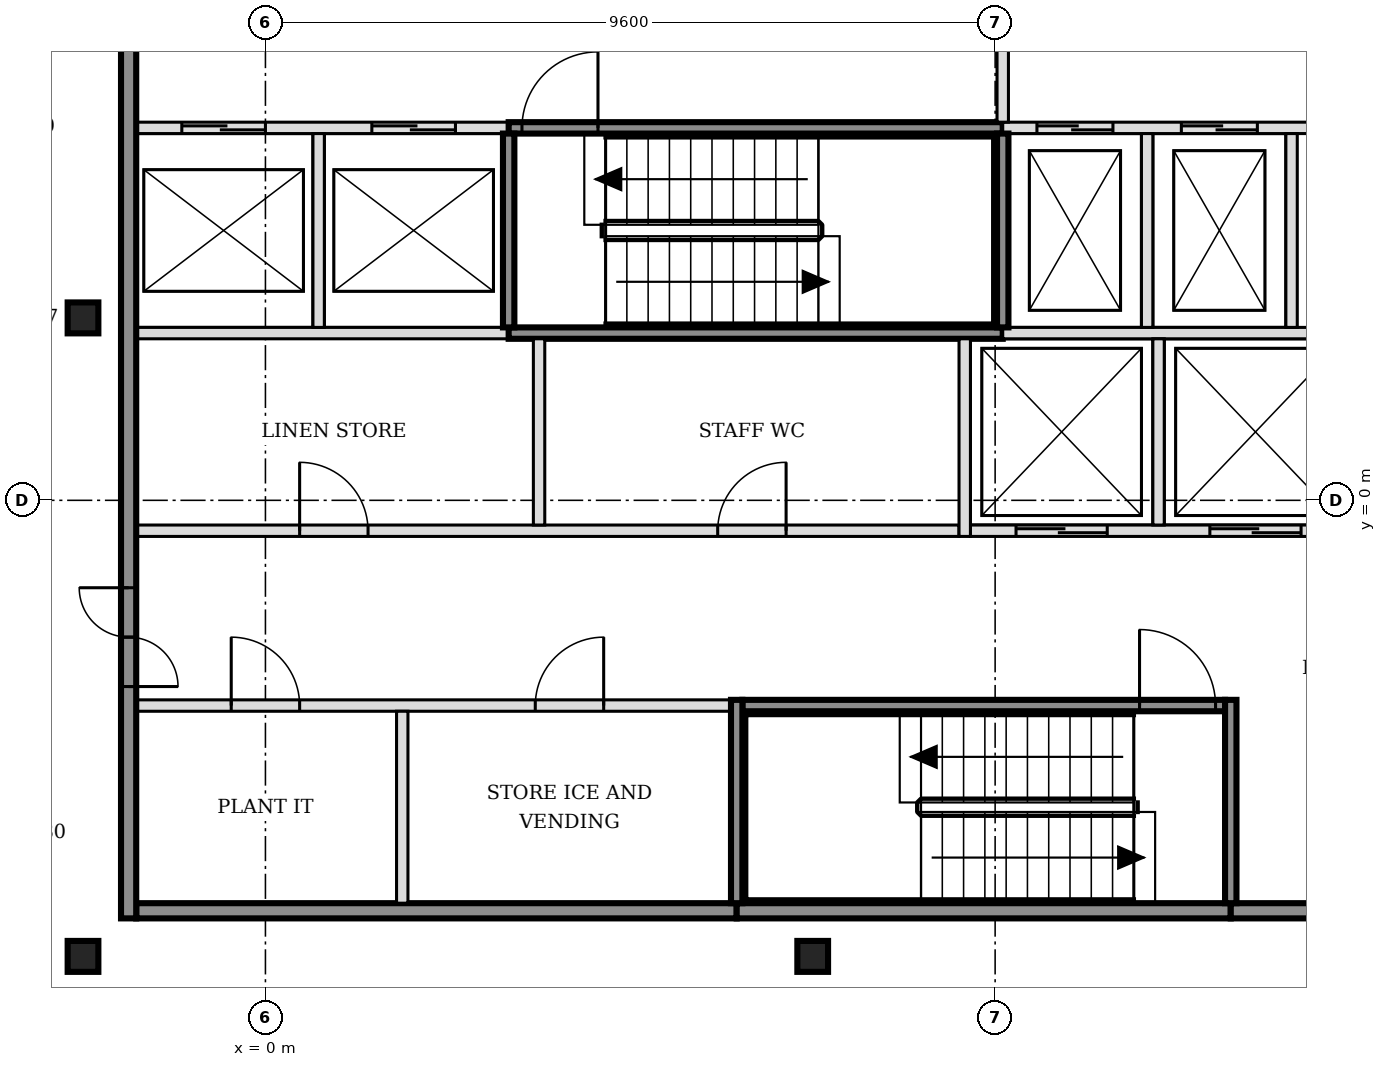
"""IFC4 building model, lengths in metres.
Left out: names, types, materials, properties, quantities, classifications, styles, units other than length and angle.
Written with IfcOpenShell. Run it as: python <this file> out.ifc"""

import sys

from ifc_helpers import new_model, si_unit, direction, frame, frame_2d, origin, origin_2d, place, context, subcontext, project, spatial, rectangle, i_section, extrude, element, fill, save


model = new_model("IFC4")
c1 = context("Model", 3, precision=1e-05, world=origin(), true_north=direction((0.0, 1.0)))
c2 = subcontext(c1, "Body", "Model", "MODEL_VIEW")
j1 = project(units=[si_unit("LENGTHUNIT", "METRE"), si_unit("PLANEANGLEUNIT", "RADIAN")], contexts=[c1])
p1 = place(None, origin())
s1 = spatial("IfcSite", under=j1, at=p1, CompositionType="ELEMENT")
p2 = place(p1, origin())
s2 = spatial("IfcBuilding", under=s1, at=p2, CompositionType="ELEMENT")
p3 = place(p2, frame((0.0, 0.0, 193.8)))
s3 = spatial("IfcBuildingStorey", under=s2, at=p3, CompositionType="ELEMENT", Elevation=193.8)
for number, where, z_axis, x_axis in (
    (1, (-2.4, -6.0, -0.15), (0.0, 0.0, 1.0), (1.0, 0.0, 0.0)),
    (2, (7.2, -6.0, -0.15), (0.0, 0.0, 1.0), (1.0, 0.0, 0.0)),
    (3, (-2.4, 2.4, -0.15), (0.0, 0.0, 1.0), (1.0, 0.0, 0.0)),
):
    element("IfcColumn", number, at=place(p3, frame(where, z_axis=z_axis, x_axis=x_axis)), inside=s3, PredefinedType="COLUMN", context=c2, shape_type="SweptSolid", body=[
        extrude(i_section(OverallWidth=0.404, OverallDepth=0.407, WebThickness=0.027, FlangeThickness=0.044, FilletRadius=0.015, at=origin_2d()), origin(), (0.0, 0.0, 1.0), 3.6),
    ])
p4 = place(p3, frame((-1.7, -5.4, 0.0), z_axis=(0.0, 0.0, 1.0), x_axis=(1.0, 0.0, 0.0)))
e4 = element("IfcWall", 4, at=p4, inside=s3, PredefinedType="SOLIDWALL", context=c2, shape_type="SweptSolid", body=[
    extrude(rectangle(XDim=7.9, YDim=0.2, at=frame_2d((3.95, 0.0))), origin(), (0.0, 0.0, 1.0), 3.45),
])
p5 = place(p3, frame((6.2, -5.4, 0.0), z_axis=(0.0, 0.0, 1.0), x_axis=(1.0, 0.0, 0.0)))
e5 = element("IfcWall", 5, at=p5, inside=s3, PredefinedType="SOLIDWALL", context=c2, shape_type="SweptSolid", body=[
    extrude(rectangle(XDim=6.5, YDim=0.2, at=frame_2d((3.25, 0.0))), origin(), (0.0, 0.0, 1.0), 3.45),
])
p6 = place(p3, frame((12.7, -5.4, 0.0), z_axis=(0.0, 0.0, 1.0), x_axis=(1.0, 0.0, 0.0)))
e6 = element("IfcWall", 6, at=p6, inside=s3, PredefinedType="SOLIDWALL", context=c2, shape_type="SweptSolid", body=[
    extrude(rectangle(XDim=3.4, YDim=0.2, at=frame_2d((1.7, 0.0))), origin(), (0.0, 0.0, 1.0), 3.45),
])
p7 = place(p3, frame((-1.7, -2.7, 0.0), z_axis=(0.0, 0.0, 1.0), x_axis=(1.0, 0.0, 0.0)))
e7 = element("IfcWall", 7, at=p7, inside=s3, PredefinedType="PARTITIONING", context=c2, shape_type="SweptSolid", body=[
    extrude(rectangle(XDim=7.825, YDim=0.15, at=frame_2d((3.913, 0.0))), origin(), (0.0, 0.0, 1.0), 3.45),
])
p8 = place(p7, frame((1.25, 0.0, 0.0)))
e8 = element("IfcOpeningElement", 8, at=p8, cuts=e7, PredefinedType="OPENING", context=c2, shape_type="SweptSolid", body=[
    extrude(rectangle(XDim=0.9, YDim=2.1, at=frame_2d((0.45, 1.05))), frame((0.0, 0.085, 0.0), z_axis=(0.0, -1.0, 0.0), x_axis=(1.0, 0.0, 0.0)), (0.0, 0.0, 1.0), 0.17),
])
p9 = place(p7, frame((5.25, 0.0, 0.0)))
e9 = element("IfcOpeningElement", 9, at=p9, cuts=e7, PredefinedType="OPENING", context=c2, shape_type="SweptSolid", body=[
    extrude(rectangle(XDim=0.9, YDim=2.1, at=frame_2d((0.45, 1.05))), frame((0.0, 0.085, 0.0), z_axis=(0.0, -1.0, 0.0), x_axis=(1.0, 0.0, 0.0)), (0.0, 0.0, 1.0), 0.17),
])
p10 = place(p3, frame((6.275, -2.7, 0.0), z_axis=(0.0, 0.0, 1.0), x_axis=(1.0, 0.0, 0.0)))
e10 = element("IfcWall", 10, at=p10, inside=s3, PredefinedType="SOLIDWALL", context=c2, shape_type="SweptSolid", body=[
    extrude(rectangle(XDim=6.35, YDim=0.15, at=frame_2d((3.175, 0.0))), origin(), (0.0, 0.0, 1.0), 3.45),
])
p11 = place(p10, frame((5.225, 0.0, 0.0)))
e11 = element("IfcOpeningElement", 11, at=p11, cuts=e10, PredefinedType="OPENING", context=c2, shape_type="SweptSolid", body=[
    extrude(rectangle(XDim=1.0, YDim=2.1, at=frame_2d((0.5, 1.05))), frame((0.0, 0.085, 0.0), z_axis=(0.0, -1.0, 0.0), x_axis=(1.0, 0.0, 0.0)), (0.0, 0.0, 1.0), 0.17),
])
p12 = place(p3, frame((-1.7, -0.4, 0.0), z_axis=(0.0, 0.0, 1.0), x_axis=(1.0, 0.0, 0.0)))
e12 = element("IfcWall", 12, at=p12, inside=s3, PredefinedType="PARTITIONING", context=c2, shape_type="SweptSolid", body=[
    extrude(rectangle(XDim=10.825, YDim=0.15, at=frame_2d((5.413, 0.0))), origin(), (0.0, 0.0, 1.0), 3.45),
])
p13 = place(p12, frame((2.15, 0.0, 0.0)))
e13 = element("IfcOpeningElement", 13, at=p13, cuts=e12, PredefinedType="OPENING", context=c2, shape_type="SweptSolid", body=[
    extrude(rectangle(XDim=0.9, YDim=2.1, at=frame_2d((0.45, 1.05))), frame((0.0, 0.085, 0.0), z_axis=(0.0, -1.0, 0.0), x_axis=(1.0, 0.0, 0.0)), (0.0, 0.0, 1.0), 0.17),
])
p14 = place(p12, frame((7.65, 0.0, 0.0)))
e14 = element("IfcOpeningElement", 14, at=p14, cuts=e12, PredefinedType="OPENING", context=c2, shape_type="SweptSolid", body=[
    extrude(rectangle(XDim=0.9, YDim=2.1, at=frame_2d((0.45, 1.05))), frame((0.0, 0.085, 0.0), z_axis=(0.0, -1.0, 0.0), x_axis=(1.0, 0.0, 0.0)), (0.0, 0.0, 1.0), 0.17),
])
p15 = place(p3, frame((9.275, -0.4, 0.0), z_axis=(0.0, 0.0, 1.0), x_axis=(1.0, 0.0, 0.0)))
e15 = element("IfcWall", 15, at=p15, inside=s3, PredefinedType="SOLIDWALL", context=c2, shape_type="SweptSolid", body=[
    extrude(rectangle(XDim=4.95, YDim=0.15, at=frame_2d((2.475, 0.0))), origin(), (0.0, 0.0, 1.0), 3.45),
])
p16 = place(p15, frame((0.6, 0.0, 0.0)))
e16 = element("IfcOpeningElement", 16, at=p16, cuts=e15, PredefinedType="OPENING", context=c2, shape_type="SweptSolid", body=[
    extrude(rectangle(XDim=1.2, YDim=2.1, at=frame_2d((0.6, 1.05))), frame((0.0, 0.085, 0.0), z_axis=(0.0, -1.0, 0.0), x_axis=(1.0, 0.0, 0.0)), (0.0, 0.0, 1.0), 0.17),
])
p17 = place(p15, frame((3.15, 0.0, 0.0)))
e17 = element("IfcOpeningElement", 17, at=p17, cuts=e15, PredefinedType="OPENING", context=c2, shape_type="SweptSolid", body=[
    extrude(rectangle(XDim=1.2, YDim=2.1, at=frame_2d((0.6, 1.05))), frame((0.0, 0.085, 0.0), z_axis=(0.0, -1.0, 0.0), x_axis=(1.0, 0.0, 0.0)), (0.0, 0.0, 1.0), 0.17),
])
p18 = place(p3, frame((-1.7, 2.2, 0.0), z_axis=(0.0, 0.0, 1.0), x_axis=(1.0, 0.0, 0.0)))
e18 = element("IfcWall", 18, at=p18, inside=s3, PredefinedType="SOLIDWALL", context=c2, shape_type="SweptSolid", body=[
    extrude(rectangle(XDim=4.9, YDim=0.15, at=frame_2d((2.45, 0.0))), origin(), (0.0, 0.0, 1.0), 3.45),
])
p19 = place(p3, frame((3.2, 2.2, 0.0), z_axis=(0.0, 0.0, 1.0), x_axis=(1.0, 0.0, 0.0)))
e19 = element("IfcWall", 19, at=p19, inside=s3, PredefinedType="SOLIDWALL", context=c2, shape_type="SweptSolid", body=[
    extrude(rectangle(XDim=6.5, YDim=0.15, at=frame_2d((3.25, 0.0))), origin(), (0.0, 0.0, 1.0), 3.45),
])
p20 = place(p3, frame((9.7, 2.2, 0.0), z_axis=(0.0, 0.0, 1.0), x_axis=(1.0, 0.0, 0.0)))
e20 = element("IfcWall", 20, at=p20, inside=s3, PredefinedType="SOLIDWALL", context=c2, shape_type="SweptSolid", body=[
    extrude(rectangle(XDim=4.525, YDim=0.15, at=frame_2d((2.263, 0.0))), origin(), (0.0, 0.0, 1.0), 3.45),
])
p21 = place(p3, frame((-1.7, 4.9, 0.0), z_axis=(0.0, 0.0, 1.0), x_axis=(1.0, 0.0, 0.0)))
e21 = element("IfcWall", 21, at=p21, inside=s3, PredefinedType="SOLIDWALL", context=c2, shape_type="SweptSolid", body=[
    extrude(rectangle(XDim=4.9, YDim=0.15, at=frame_2d((2.45, 0.0))), origin(), (0.0, 0.0, 1.0), 3.45),
])
p22 = place(p21, frame((0.6, 0.0, 0.0)))
e22 = element("IfcOpeningElement", 22, at=p22, cuts=e21, PredefinedType="OPENING", context=c2, shape_type="SweptSolid", body=[
    extrude(rectangle(XDim=1.1, YDim=2.1, at=frame_2d((0.55, 1.05))), frame((0.0, 0.085, 0.0), z_axis=(0.0, -1.0, 0.0), x_axis=(1.0, 0.0, 0.0)), (0.0, 0.0, 1.0), 0.17),
])
p23 = place(p21, frame((3.1, 0.0, 0.0)))
e23 = element("IfcOpeningElement", 23, at=p23, cuts=e21, PredefinedType="OPENING", context=c2, shape_type="SweptSolid", body=[
    extrude(rectangle(XDim=1.1, YDim=2.1, at=frame_2d((0.55, 1.05))), frame((0.0, 0.085, 0.0), z_axis=(0.0, -1.0, 0.0), x_axis=(1.0, 0.0, 0.0)), (0.0, 0.0, 1.0), 0.17),
])
p24 = place(p3, frame((3.2, 4.9, 0.0), z_axis=(0.0, 0.0, 1.0), x_axis=(1.0, 0.0, 0.0)))
e24 = element("IfcWall", 24, at=p24, inside=s3, PredefinedType="SOLIDWALL", context=c2, shape_type="SweptSolid", body=[
    extrude(rectangle(XDim=6.5, YDim=0.15, at=frame_2d((3.25, 0.0))), origin(), (0.0, 0.0, 1.0), 3.45),
])
p25 = place(p24, frame((0.175, 0.0, 0.0)))
e25 = element("IfcOpeningElement", 25, at=p25, cuts=e24, PredefinedType="OPENING", context=c2, shape_type="SweptSolid", body=[
    extrude(rectangle(XDim=1.0, YDim=2.1, at=frame_2d((0.5, 1.05))), frame((0.0, 0.085, 0.0), z_axis=(0.0, -1.0, 0.0), x_axis=(1.0, 0.0, 0.0)), (0.0, 0.0, 1.0), 0.17),
])
p26 = place(p3, frame((9.7, 4.9, 0.0), z_axis=(0.0, 0.0, 1.0), x_axis=(1.0, 0.0, 0.0)))
e26 = element("IfcWall", 26, at=p26, inside=s3, PredefinedType="SOLIDWALL", context=c2, shape_type="SweptSolid", body=[
    extrude(rectangle(XDim=6.4, YDim=0.15, at=frame_2d((3.2, 0.0))), origin(), (0.0, 0.0, 1.0), 3.45),
])
p27 = place(p26, frame((0.45, 0.0, 0.0)))
e27 = element("IfcOpeningElement", 27, at=p27, cuts=e26, PredefinedType="OPENING", context=c2, shape_type="SweptSolid", body=[
    extrude(rectangle(XDim=1.0, YDim=2.1, at=frame_2d((0.5, 1.05))), frame((0.0, 0.085, 0.0), z_axis=(0.0, -1.0, 0.0), x_axis=(1.0, 0.0, 0.0)), (0.0, 0.0, 1.0), 0.17),
])
p28 = place(p26, frame((2.35, 0.0, 0.0)))
e28 = element("IfcOpeningElement", 28, at=p28, cuts=e26, PredefinedType="OPENING", context=c2, shape_type="SweptSolid", body=[
    extrude(rectangle(XDim=1.0, YDim=2.1, at=frame_2d((0.5, 1.05))), frame((0.0, 0.085, 0.0), z_axis=(0.0, -1.0, 0.0), x_axis=(1.0, 0.0, 0.0)), (0.0, 0.0, 1.0), 0.17),
])
p29 = place(p26, frame((4.7, 0.0, 0.0)))
e29 = element("IfcOpeningElement", 29, at=p29, cuts=e26, PredefinedType="OPENING", context=c2, shape_type="SweptSolid", body=[
    extrude(rectangle(XDim=0.9, YDim=2.1, at=frame_2d((0.45, 1.05))), frame((0.0, 0.085, 0.0), z_axis=(0.0, -1.0, 0.0), x_axis=(1.0, 0.0, 0.0)), (0.0, 0.0, 1.0), 0.17),
])
p30 = place(p3, frame((-1.8, -5.5, 0.0), z_axis=(0.0, 0.0, 1.0), x_axis=(0.0, 1.0, 0.0)))
e30 = element("IfcWall", 30, at=p30, inside=s3, PredefinedType="SOLIDWALL", context=c2, shape_type="SweptSolid", body=[
    extrude(rectangle(XDim=15.8, YDim=0.2, at=frame_2d((7.9, 0.0))), origin(), (0.0, 0.0, 1.0), 3.45),
])
p31 = place(p30, frame((3.05, 0.0, 0.0)))
e31 = element("IfcOpeningElement", 31, at=p31, cuts=e30, PredefinedType="OPENING", context=c2, shape_type="SweptSolid", body=[
    extrude(rectangle(XDim=1.3, YDim=2.1, at=frame_2d((0.65, 1.05))), frame((0.0, 0.11, 0.0), z_axis=(0.0, -1.0, 0.0), x_axis=(1.0, 0.0, 0.0)), (0.0, 0.0, 1.0), 0.22),
])
p32 = place(p30, frame((11.45, 0.0, 0.0)))
e32 = element("IfcOpeningElement", 32, at=p32, cuts=e30, PredefinedType="OPENING", context=c2, shape_type="SweptSolid", body=[
    extrude(rectangle(XDim=1.3, YDim=2.1, at=frame_2d((0.65, 1.05))), frame((0.0, 0.11, 0.0), z_axis=(0.0, -1.0, 0.0), x_axis=(1.0, 0.0, 0.0)), (0.0, 0.0, 1.0), 0.22),
])
p33 = place(p3, frame((0.7, 2.275, 0.0), z_axis=(0.0, 0.0, 1.0), x_axis=(0.0, 1.0, 0.0)))
e33 = element("IfcWall", 33, at=p33, inside=s3, PredefinedType="SOLIDWALL", context=c2, shape_type="SweptSolid", body=[
    extrude(rectangle(XDim=2.55, YDim=0.15, at=frame_2d((1.275, 0.0))), origin(), (0.0, 0.0, 1.0), 3.45),
])
p34 = place(p3, frame((1.8, -5.3, 0.0), z_axis=(0.0, 0.0, 1.0), x_axis=(0.0, 1.0, 0.0)))
e34 = element("IfcWall", 34, at=p34, inside=s3, PredefinedType="PARTITIONING", context=c2, shape_type="SweptSolid", body=[
    extrude(rectangle(XDim=2.525, YDim=0.15, at=frame_2d((1.263, 0.0))), origin(), (0.0, 0.0, 1.0), 3.45),
])
p35 = place(p3, frame((3.2, 2.275, 0.0), z_axis=(0.0, 0.0, 1.0), x_axis=(0.0, 1.0, 0.0)))
e35 = element("IfcWall", 35, at=p35, inside=s3, PredefinedType="SOLIDWALL", context=c2, shape_type="SweptSolid", body=[
    extrude(rectangle(XDim=2.55, YDim=0.15, at=frame_2d((1.275, 0.0))), origin(), (0.0, 0.0, 1.0), 3.45),
])
p36 = place(p3, frame((3.6, -0.325, 0.0), z_axis=(0.0, 0.0, 1.0), x_axis=(0.0, 1.0, 0.0)))
e36 = element("IfcWall", 36, at=p36, inside=s3, PredefinedType="PARTITIONING", context=c2, shape_type="SweptSolid", body=[
    extrude(rectangle(XDim=2.45, YDim=0.15, at=frame_2d((1.225, 0.0))), origin(), (0.0, 0.0, 1.0), 3.45),
])
p37 = place(p3, frame((6.2, -5.3, 0.0), z_axis=(0.0, 0.0, 1.0), x_axis=(0.0, 1.0, 0.0)))
e37 = element("IfcWall", 37, at=p37, inside=s3, PredefinedType="SOLIDWALL", context=c2, shape_type="SweptSolid", body=[
    extrude(rectangle(XDim=2.675, YDim=0.15, at=frame_2d((1.337, 0.0))), origin(), (0.0, 0.0, 1.0), 3.45),
])
p38 = place(p3, frame((9.2, -0.475, 0.0), z_axis=(0.0, 0.0, 1.0), x_axis=(0.0, 1.0, 0.0)))
e38 = element("IfcWall", 38, at=p38, inside=s3, PredefinedType="SOLIDWALL", context=c2, shape_type="SweptSolid", body=[
    extrude(rectangle(XDim=2.6, YDim=0.15, at=frame_2d((1.3, 0.0))), origin(), (0.0, 0.0, 1.0), 3.45),
])
p39 = place(p3, frame((9.7, 2.275, 0.0), z_axis=(0.0, 0.0, 1.0), x_axis=(0.0, 1.0, 0.0)))
e39 = element("IfcWall", 39, at=p39, inside=s3, PredefinedType="SOLIDWALL", context=c2, shape_type="SweptSolid", body=[
    extrude(rectangle(XDim=2.55, YDim=0.15, at=frame_2d((1.275, 0.0))), origin(), (0.0, 0.0, 1.0), 3.45),
])
p40 = place(p3, frame((9.7, 4.975, 0.0), z_axis=(0.0, 0.0, 1.0), x_axis=(0.0, 1.0, 0.0)))
e40 = element("IfcWall", 40, at=p40, inside=s3, PredefinedType="SOLIDWALL", context=c2, shape_type="SweptSolid", body=[
    extrude(rectangle(XDim=2.45, YDim=0.15, at=frame_2d((1.225, 0.0))), origin(), (0.0, 0.0, 1.0), 3.45),
])
p41 = place(p3, frame((11.6, 2.275, 0.0), z_axis=(0.0, 0.0, 1.0), x_axis=(0.0, 1.0, 0.0)))
e41 = element("IfcWall", 41, at=p41, inside=s3, PredefinedType="SOLIDWALL", context=c2, shape_type="SweptSolid", body=[
    extrude(rectangle(XDim=2.55, YDim=0.15, at=frame_2d((1.275, 0.0))), origin(), (0.0, 0.0, 1.0), 3.45),
])
p42 = place(p3, frame((11.75, -0.325, 0.0), z_axis=(0.0, 0.0, 1.0), x_axis=(0.0, 1.0, 0.0)))
e42 = element("IfcWall", 42, at=p42, inside=s3, PredefinedType="SOLIDWALL", context=c2, shape_type="SweptSolid", body=[
    extrude(rectangle(XDim=2.45, YDim=0.15, at=frame_2d((1.225, 0.0))), origin(), (0.0, 0.0, 1.0), 3.45),
])
p43 = place(p3, frame((12.7, -5.3, 0.0), z_axis=(0.0, 0.0, 1.0), x_axis=(0.0, 1.0, 0.0)))
e43 = element("IfcWall", 43, at=p43, inside=s3, PredefinedType="SOLIDWALL", context=c2, shape_type="SweptSolid", body=[
    extrude(rectangle(XDim=2.675, YDim=0.15, at=frame_2d((1.337, 0.0))), origin(), (0.0, 0.0, 1.0), 3.45),
])
p44 = place(p3, frame((13.5, 2.275, 0.0), z_axis=(0.0, 0.0, 1.0), x_axis=(0.0, 1.0, 0.0)))
e44 = element("IfcWall", 44, at=p44, inside=s3, PredefinedType="SOLIDWALL", context=c2, shape_type="SweptSolid", body=[
    extrude(rectangle(XDim=2.55, YDim=0.15, at=frame_2d((1.275, 0.0))), origin(), (0.0, 0.0, 1.0), 3.45),
])
p45 = place(p16, origin())
e45 = element("IfcDoor", 45, at=p45, inside=s3, OperationType="DOUBLE_DOOR_SLIDING", PredefinedType="DOOR", context=c2, shape_type="SweptSolid", body=[
    extrude(rectangle(XDim=1.2, YDim=2.1, at=frame_2d((0.6, 1.05))), frame((0.0, 0.025, 0.0), z_axis=(0.0, -1.0, 0.0), x_axis=(1.0, 0.0, 0.0)), (0.0, 0.0, 1.0), 0.05),
])
fill(e16, e45)
p46 = place(p17, origin())
e46 = element("IfcDoor", 46, at=p46, inside=s3, OperationType="DOUBLE_DOOR_SLIDING", PredefinedType="DOOR", context=c2, shape_type="SweptSolid", body=[
    extrude(rectangle(XDim=1.2, YDim=2.1, at=frame_2d((0.6, 1.05))), frame((0.0, 0.025, 0.0), z_axis=(0.0, -1.0, 0.0), x_axis=(1.0, 0.0, 0.0)), (0.0, 0.0, 1.0), 0.05),
])
fill(e17, e46)
p47 = place(p22, origin())
e47 = element("IfcDoor", 47, at=p47, inside=s3, OperationType="DOUBLE_DOOR_SLIDING", PredefinedType="DOOR", context=c2, shape_type="SweptSolid", body=[
    extrude(rectangle(XDim=1.1, YDim=2.1, at=frame_2d((0.55, 1.05))), frame((0.0, 0.025, 0.0), z_axis=(0.0, -1.0, 0.0), x_axis=(1.0, 0.0, 0.0)), (0.0, 0.0, 1.0), 0.05),
])
fill(e22, e47)
p48 = place(p23, origin())
e48 = element("IfcDoor", 48, at=p48, inside=s3, OperationType="DOUBLE_DOOR_SLIDING", PredefinedType="DOOR", context=c2, shape_type="SweptSolid", body=[
    extrude(rectangle(XDim=1.1, YDim=2.1, at=frame_2d((0.55, 1.05))), frame((0.0, 0.025, 0.0), z_axis=(0.0, -1.0, 0.0), x_axis=(1.0, 0.0, 0.0)), (0.0, 0.0, 1.0), 0.05),
])
fill(e23, e48)
p49 = place(p27, origin())
e49 = element("IfcDoor", 49, at=p49, inside=s3, OperationType="DOUBLE_DOOR_SLIDING", PredefinedType="DOOR", context=c2, shape_type="SweptSolid", body=[
    extrude(rectangle(XDim=1.0, YDim=2.1, at=frame_2d((0.5, 1.05))), frame((0.0, 0.025, 0.0), z_axis=(0.0, -1.0, 0.0), x_axis=(1.0, 0.0, 0.0)), (0.0, 0.0, 1.0), 0.05),
])
fill(e27, e49)
p50 = place(p28, origin())
e50 = element("IfcDoor", 50, at=p50, inside=s3, OperationType="DOUBLE_DOOR_SLIDING", PredefinedType="DOOR", context=c2, shape_type="SweptSolid", body=[
    extrude(rectangle(XDim=1.0, YDim=2.1, at=frame_2d((0.5, 1.05))), frame((0.0, 0.025, 0.0), z_axis=(0.0, -1.0, 0.0), x_axis=(1.0, 0.0, 0.0)), (0.0, 0.0, 1.0), 0.05),
])
fill(e28, e50)
p51 = place(p11, origin())
e51 = element("IfcDoor", 51, at=p51, inside=s3, OperationType="SINGLE_SWING_LEFT", PredefinedType="DOOR", context=c2, shape_type="SweptSolid", body=[
    extrude(rectangle(XDim=1.0, YDim=2.1, at=frame_2d((0.5, 1.05))), frame((0.0, 0.025, 0.0), z_axis=(0.0, -1.0, 0.0), x_axis=(1.0, 0.0, 0.0)), (0.0, 0.0, 1.0), 0.05),
])
fill(e11, e51)
p52 = place(p25, origin())
e52 = element("IfcDoor", 52, at=p52, inside=s3, OperationType="SINGLE_SWING_RIGHT", PredefinedType="DOOR", context=c2, shape_type="SweptSolid", body=[
    extrude(rectangle(XDim=1.0, YDim=2.1, at=frame_2d((0.5, 1.05))), frame((0.0, 0.025, 0.0), z_axis=(0.0, -1.0, 0.0), x_axis=(1.0, 0.0, 0.0)), (0.0, 0.0, 1.0), 0.05),
])
fill(e25, e52)
p53 = place(p31, origin())
e53 = element("IfcDoor", 53, at=p53, inside=s3, OperationType="DOUBLE_DOOR_SINGLE_SWING", PredefinedType="DOOR", context=c2, shape_type="SweptSolid", body=[
    extrude(rectangle(XDim=1.3, YDim=2.1, at=frame_2d((0.65, 1.05))), frame((0.0, 0.025, 0.0), z_axis=(0.0, -1.0, 0.0), x_axis=(1.0, 0.0, 0.0)), (0.0, 0.0, 1.0), 0.05),
])
fill(e31, e53)
p54 = place(p8, origin())
e54 = element("IfcDoor", 54, at=p54, inside=s3, OperationType="SINGLE_SWING_LEFT", PredefinedType="DOOR", context=c2, shape_type="SweptSolid", body=[
    extrude(rectangle(XDim=0.9, YDim=2.1, at=frame_2d((0.45, 1.05))), frame((0.0, 0.025, 0.0), z_axis=(0.0, -1.0, 0.0), x_axis=(1.0, 0.0, 0.0)), (0.0, 0.0, 1.0), 0.05),
])
fill(e8, e54)
p55 = place(p9, origin())
e55 = element("IfcDoor", 55, at=p55, inside=s3, OperationType="SINGLE_SWING_RIGHT", PredefinedType="DOOR", context=c2, shape_type="SweptSolid", body=[
    extrude(rectangle(XDim=0.9, YDim=2.1, at=frame_2d((0.45, 1.05))), frame((0.0, 0.025, 0.0), z_axis=(0.0, -1.0, 0.0), x_axis=(1.0, 0.0, 0.0)), (0.0, 0.0, 1.0), 0.05),
])
fill(e9, e55)
p56 = place(p13, origin())
e56 = element("IfcDoor", 56, at=p56, inside=s3, OperationType="SINGLE_SWING_LEFT", PredefinedType="DOOR", context=c2, shape_type="SweptSolid", body=[
    extrude(rectangle(XDim=0.9, YDim=2.1, at=frame_2d((0.45, 1.05))), frame((0.0, 0.025, 0.0), z_axis=(0.0, -1.0, 0.0), x_axis=(1.0, 0.0, 0.0)), (0.0, 0.0, 1.0), 0.05),
])
fill(e13, e56)
p57 = place(p14, origin())
e57 = element("IfcDoor", 57, at=p57, inside=s3, OperationType="SINGLE_SWING_RIGHT", PredefinedType="DOOR", context=c2, shape_type="SweptSolid", body=[
    extrude(rectangle(XDim=0.9, YDim=2.1, at=frame_2d((0.45, 1.05))), frame((0.0, 0.025, 0.0), z_axis=(0.0, -1.0, 0.0), x_axis=(1.0, 0.0, 0.0)), (0.0, 0.0, 1.0), 0.05),
])
fill(e14, e57)
save(model, sys.argv[1])
